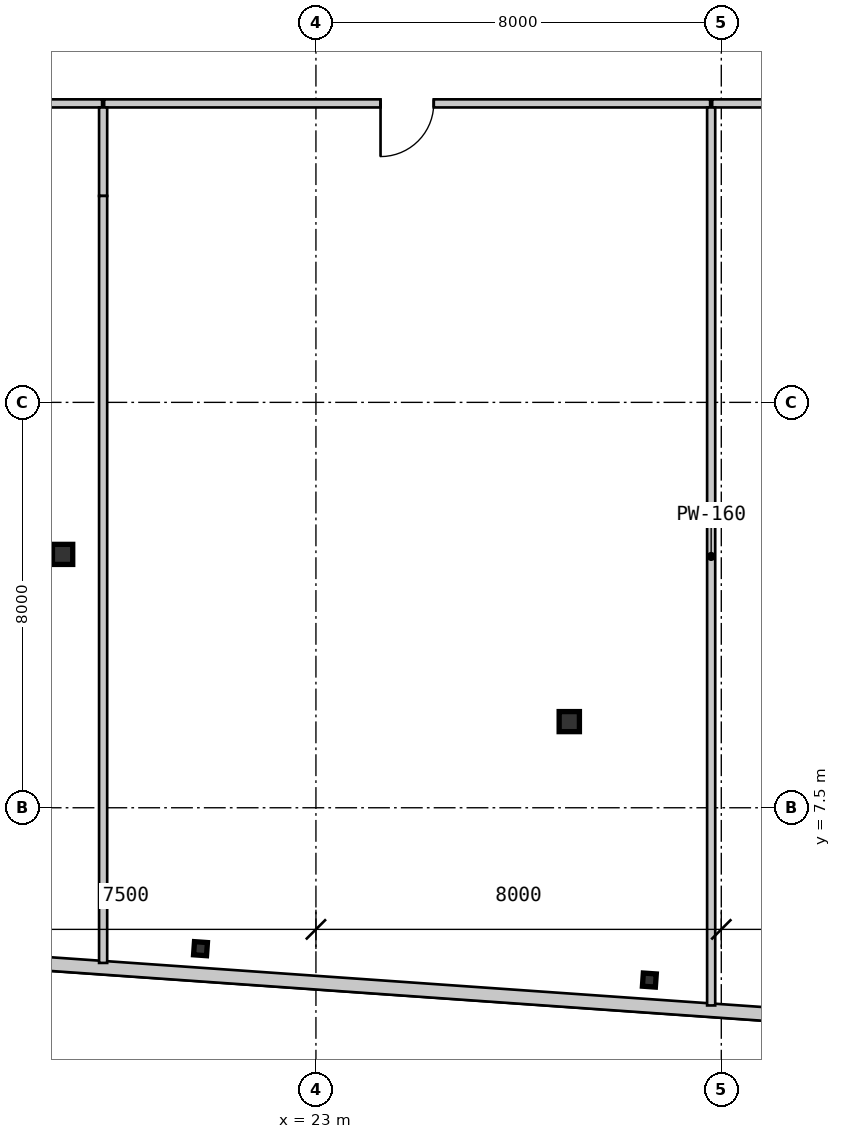
"""IFC4 building model, lengths in metres.
Left out: names, types, materials, properties, quantities, classifications, styles, units other than length and angle.
Written with IfcOpenShell. Run it as: python <this file> out.ifc"""

import sys

from ifc_helpers import new_model, si_unit, direction, frame, frame_2d, origin, origin_2d, place, context, subcontext, project, spatial, rectangle, i_section, extrude, source, transform, mapped, element, fill, save


model = new_model("IFC4")
c1 = context("Model", 3, precision=1e-05, world=origin(), true_north=direction((0.0, 1.0)))
c2 = subcontext(c1, "Body", "Model", "MODEL_VIEW")
j1 = project(units=[si_unit("LENGTHUNIT", "METRE"), si_unit("PLANEANGLEUNIT", "RADIAN")], contexts=[c1])
p1 = place(None, origin())
s1 = spatial("IfcSite", under=j1, at=p1, CompositionType="ELEMENT")
p2 = place(p1, origin())
s2 = spatial("IfcBuilding", under=s1, at=p2, CompositionType="ELEMENT")
p3 = place(p2, frame((0.0, 0.0, 164.5)))
s3 = spatial("IfcBuildingStorey", under=s2, at=p3, CompositionType="ELEMENT", Elevation=164.5)
m1 = source(origin(), c2, "Body", "SweptSolid", [
    extrude(i_section(OverallWidth=0.4, OverallDepth=0.396, WebThickness=0.022, FlangeThickness=0.034, at=origin_2d()), origin(), (0.0, 0.0, 1.0), 4.2),
])
for number, where, z_axis, x_axis in (
    (1, (28.0, 9.2, 0.0), (0.0, 0.0, 1.0), (1.0, 0.0, 0.0)),
    (2, (18.0, 12.5, 0.0), (0.0, 0.0, 1.0), (1.0, 0.0, 0.0)),
):
    element("IfcColumn", number, at=place(p3, frame(where, z_axis=z_axis, x_axis=x_axis)), inside=s3, PredefinedType="COLUMN", context=c2, shape_type="MappedRepresentation", body=[
        mapped(m1, transform((0.0, 0.0, 0.0), scale=1.0)),
    ])
m2 = source(origin(), c2, "Body", "SweptSolid", [
    extrude(i_section(OverallWidth=0.256, OverallDepth=0.26, WebThickness=0.01, FlangeThickness=0.017, at=origin_2d()), origin(), (0.0, 0.0, 1.0), 4.2),
])
for number, where, z_axis, x_axis in (
    (3, (20.722, 4.719, 0.0), (0.0, 0.0, 1.0), (0.998, -0.07, 0.0)),
    (4, (29.58, 4.1, 0.0), (0.0, 0.0, 1.0), (0.998, -0.07, 0.0)),
):
    element("IfcColumn", number, at=place(p3, frame(where, z_axis=z_axis, x_axis=x_axis)), inside=s3, PredefinedType="COLUMN", context=c2, shape_type="MappedRepresentation", body=[
        mapped(m2, transform((0.0, 0.0, 0.0), scale=1.0)),
    ])
m3 = source(origin(), c2, "Body", "SweptSolid", [
    extrude(rectangle(XDim=46.0, YDim=0.27, at=frame_2d((23.0, 0.0))), origin(), (0.0, 0.0, 1.0), 3.78),
])
p4 = place(p3, frame((11.03, 4.885, 0.0), z_axis=(0.0, 0.0, 1.0), x_axis=(0.997564136604, -0.06975523895, 0.0)))
e5 = element("IfcWall", 5, at=p4, inside=s3, PredefinedType="SOLIDWALL", context=c2, shape_type="MappedRepresentation", body=[
    mapped(m3, transform((0.0, 0.0, 0.0), scale=1.0)),
])
m4 = source(origin(), c2, "Body", "SweptSolid", [
    extrude(rectangle(XDim=6.7, YDim=0.16, at=frame_2d((3.35, 0.0))), origin(), (0.0, 0.0, 1.0), 3.78),
])
p5 = place(p3, frame((18.78, 21.4, 0.0), z_axis=(0.0, 0.0, 1.0), x_axis=(-1.0, 0.0, 0.0)))
e6 = element("IfcWall", 6, at=p5, inside=s3, PredefinedType="PARTITIONING", context=c2, shape_type="MappedRepresentation", body=[
    mapped(m4, transform((0.0, 0.0, 0.0), scale=1.0)),
])
m5 = source(origin(), c2, "Body", "SweptSolid", [
    extrude(rectangle(XDim=1.05, YDim=2.1, at=frame_2d((0.525, 1.05))), frame((0.0, 0.09, 0.0), z_axis=(0.0, -1.0, 0.0), x_axis=(1.0, 0.0, 0.0)), (0.0, 0.0, 1.0), 0.18),
])
p6 = place(p5, frame((2.825, 0.0, 0.0)))
e7 = element("IfcOpeningElement", 7, at=p6, cuts=e6, PredefinedType="OPENING", context=c2, shape_type="MappedRepresentation", body=[
    mapped(m5, transform((0.0, 0.0, 0.0), scale=1.0)),
])
m6 = source(origin(), c2, "Body", "SweptSolid", [
    extrude(rectangle(XDim=11.959, YDim=0.16, at=frame_2d((5.98, 0.0))), origin(), (0.0, 0.0, 1.0), 3.78),
])
p7 = place(p3, frame((30.78, 21.4, 0.0), z_axis=(0.0, 0.0, 1.0), x_axis=(-1.0, 0.0, 0.0)))
e8 = element("IfcWall", 8, at=p7, inside=s3, PredefinedType="PARTITIONING", context=c2, shape_type="MappedRepresentation", body=[
    mapped(m6, transform((0.0, 0.0, 0.0), scale=1.0)),
])
p8 = place(p7, frame((5.455, 0.0, 0.0)))
e9 = element("IfcOpeningElement", 9, at=p8, cuts=e8, PredefinedType="OPENING", context=c2, shape_type="MappedRepresentation", body=[
    mapped(m5, transform((0.0, 0.0, 0.0), scale=1.0)),
])
p9 = place(p3, frame((42.78, 21.4, 0.0), z_axis=(0.0, 0.0, 1.0), x_axis=(-1.0, 0.0, 0.0)))
e10 = element("IfcWall", 10, at=p9, inside=s3, PredefinedType="PARTITIONING", context=c2, shape_type="MappedRepresentation", body=[
    mapped(m6, transform((0.0, 0.0, 0.0), scale=1.0)),
])
p10 = place(p9, frame((5.455, 0.0, 0.0)))
e11 = element("IfcOpeningElement", 11, at=p10, cuts=e10, PredefinedType="OPENING", context=c2, shape_type="MappedRepresentation", body=[
    mapped(m5, transform((0.0, 0.0, 0.0), scale=1.0)),
])
m7 = source(origin(), c2, "Body", "SweptSolid", [
    extrude(rectangle(XDim=1.746, YDim=0.16, at=frame_2d((0.873, 0.0))), origin(), (0.0, 0.0, 1.0), 3.247),
])
p11 = place(p3, frame((18.8, 21.32, 0.0), z_axis=(0.0, 0.0, 1.0), x_axis=(0.0, -1.0, 0.0)))
e12 = element("IfcWall", 12, at=p11, inside=s3, PredefinedType="PARTITIONING", context=c2, shape_type="MappedRepresentation", body=[
    mapped(m7, transform((0.0, 0.0, 0.0), scale=1.0)),
])
m8 = source(origin(), c2, "Body", "SweptSolid", [
    extrude(rectangle(XDim=15.136, YDim=0.16, at=frame_2d((7.568, 0.0))), origin(), (0.0, 0.0, 1.0), 3.78),
])
p12 = place(p3, frame((18.8, 19.574, 0.0), z_axis=(0.0, 0.0, 1.0), x_axis=(0.0, -1.0, 0.0)))
e13 = element("IfcWall", 13, at=p12, inside=s3, PredefinedType="PARTITIONING", context=c2, shape_type="MappedRepresentation", body=[
    mapped(m8, transform((0.0, 0.0, 0.0), scale=1.0)),
])
m9 = source(origin(), c2, "Body", "SweptSolid", [
    extrude(rectangle(XDim=17.721, YDim=0.16, at=frame_2d((8.861, 0.0))), origin(), (0.0, 0.0, 1.0), 3.78),
])
p13 = place(p3, frame((30.8, 21.32, 0.0), z_axis=(0.0, 0.0, 1.0), x_axis=(0.0, -1.0, 0.0)))
e14 = element("IfcWall", 14, at=p13, inside=s3, PredefinedType="PARTITIONING", context=c2, shape_type="MappedRepresentation", body=[
    mapped(m9, transform((0.0, 0.0, 0.0), scale=1.0)),
])
m10 = source(origin(), c2, "Body", "SweptSolid", [
    extrude(rectangle(XDim=1.05, YDim=2.1, at=frame_2d((0.525, 1.05))), frame((0.0, 0.025, 0.0), z_axis=(0.0, -1.0, 0.0), x_axis=(1.0, 0.0, 0.0)), (0.0, 0.0, 1.0), 0.05),
])
p14 = place(p8, origin())
e15 = element("IfcDoor", 15, at=p14, inside=s3, OperationType="SINGLE_SWING_RIGHT", PredefinedType="DOOR", context=c2, shape_type="MappedRepresentation", body=[
    mapped(m10, transform((0.0, 0.0, 0.0), scale=1.0)),
])
fill(e9, e15)
save(model, sys.argv[1])
